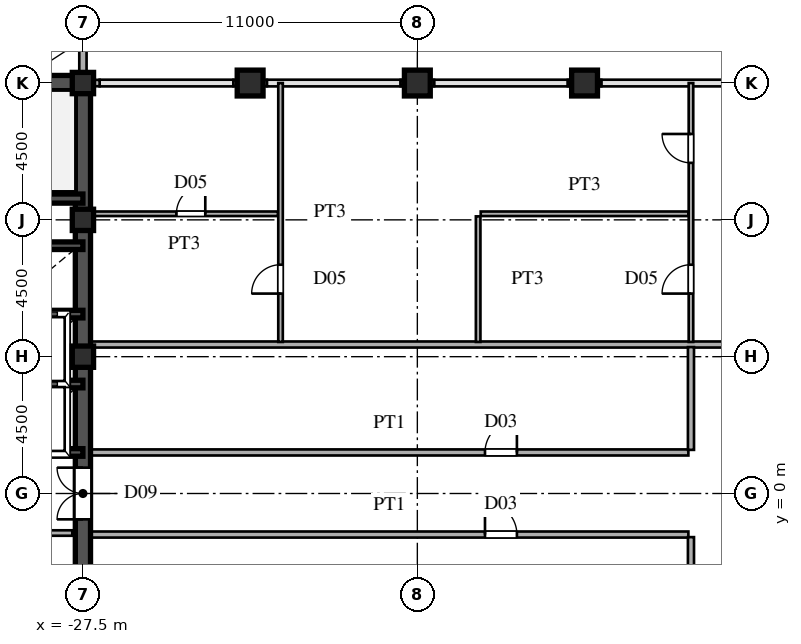
"""IFC4 building model, lengths in metres.
Left out: names, types, materials, properties, quantities, classifications, styles, units other than length and angle.
Written with IfcOpenShell. Run it as: python <this file> out.ifc"""

import sys

from ifc_helpers import new_model, si_unit, direction, frame, frame_2d, origin, origin_2d, place, context, subcontext, project, spatial, rectangle, hollow_rectangle, extrude, source, transform, mapped, element, fill, save


model = new_model("IFC4")
c1 = context("Model", 3, precision=1e-05, world=origin(), true_north=direction((0.0, 1.0)))
c2 = subcontext(c1, "Body", "Model", "MODEL_VIEW")
j1 = project(units=[si_unit("LENGTHUNIT", "METRE"), si_unit("PLANEANGLEUNIT", "RADIAN")], contexts=[c1])
p1 = place(None, origin())
s1 = spatial("IfcSite", under=j1, at=p1, CompositionType="ELEMENT")
p2 = place(p1, origin())
s2 = spatial("IfcBuilding", under=s1, at=p2, CompositionType="ELEMENT")
p3 = place(p2, frame((0.0, 0.0, 258.15)))
s3 = spatial("IfcBuildingStorey", under=s2, at=p3, CompositionType="ELEMENT", Elevation=258.15)
m1 = source(origin(), c2, "Body", "SweptSolid", [
    extrude(hollow_rectangle(XDim=0.7, YDim=0.7, WallThickness=0.03, at=origin_2d()), origin(), (0.0, 0.0, 1.0), 3.75),
])
for number, where, z_axis, x_axis in (
    (1, (-27.5, 4.5, 0.0), (0.0, 0.0, 1.0), (1.0, 0.0, 0.0)),
    (2, (-27.5, 9.0, 0.0), (0.0, 0.0, 1.0), (1.0, 0.0, 0.0)),
    (3, (-27.5, 13.5, 0.0), (0.0, 0.0, 1.0), (1.0, 0.0, 0.0)),
):
    element("IfcColumn", number, at=place(p3, frame(where, z_axis=z_axis, x_axis=x_axis)), inside=s3, PredefinedType="COLUMN", context=c2, shape_type="MappedRepresentation", body=[
        mapped(m1, transform((0.0, 0.0, 0.0), scale=1.0)),
    ])
m2 = source(origin(), c2, "Body", "SweptSolid", [
    extrude(hollow_rectangle(XDim=0.85, YDim=0.85, WallThickness=0.036, at=origin_2d()), origin(), (0.0, 0.0, 1.0), 3.75),
])
for number, where, z_axis, x_axis in (
    (4, (-22.0, 13.5, 0.0), (0.0, 0.0, 1.0), (1.0, 0.0, 0.0)),
    (5, (-16.5, 13.5, 0.0), (0.0, 0.0, 1.0), (1.0, 0.0, 0.0)),
    (6, (-11.0, 13.5, 0.0), (0.0, 0.0, 1.0), (1.0, 0.0, 0.0)),
):
    element("IfcColumn", number, at=place(p3, frame(where, z_axis=z_axis, x_axis=x_axis)), inside=s3, PredefinedType="COLUMN", context=c2, shape_type="MappedRepresentation", body=[
        mapped(m2, transform((0.0, 0.0, 0.0), scale=1.0)),
    ])
p4 = place(p3, frame((-27.5, 13.755, 0.0), z_axis=(0.0, 0.0, 1.0), x_axis=(0.0, 1.0, 0.0)))
e7 = element("IfcWall", 7, at=p4, inside=s3, PredefinedType="SOLIDWALL", context=c2, shape_type="SweptSolid", body=[
    extrude(rectangle(XDim=0.62, YDim=0.24, at=frame_2d((0.31, 0.0))), origin(), (0.0, 0.0, 1.0), 3.03),
])
p5 = place(p3, frame((-27.5, 14.375, 0.0), z_axis=(0.0, 0.0, 1.0), x_axis=(0.0, 1.0, 0.0)))
e8 = element("IfcWall", 8, at=p5, inside=s3, PredefinedType="SOLIDWALL", context=c2, shape_type="SweptSolid", body=[
    extrude(rectangle(XDim=1.605, YDim=0.24, at=frame_2d((0.803, 0.0))), origin(), (0.0, 0.0, 1.0), 3.53),
])
p6 = place(p3, frame((-27.49, 13.5, 0.0), z_axis=(0.0, 0.0, 1.0), x_axis=(1.0, 0.0, 0.0)))
e9 = element("IfcWall", 9, at=p6, inside=s3, PredefinedType="SOLIDWALL", context=c2, shape_type="SweptSolid", body=[
    extrude(rectangle(XDim=0.54, YDim=0.21, at=frame_2d((0.27, 0.0))), origin(), (0.0, 0.0, 1.0), 3.03),
])
for number, where, z_axis, x_axis in (
    (10, (-22.55, 13.5, 0.0), (0.0, 0.0, 1.0), (1.0, 0.0, 0.0)),
    (11, (-17.05, 13.5, 0.0), (0.0, 0.0, 1.0), (1.0, 0.0, 0.0)),
    (12, (-11.55, 13.5, 0.0), (0.0, 0.0, 1.0), (1.0, 0.0, 0.0)),
):
    element("IfcWall", number, at=place(p3, frame(where, z_axis=z_axis, x_axis=x_axis)), inside=s3, PredefinedType="SOLIDWALL", context=c2, shape_type="SweptSolid", body=[
        extrude(rectangle(XDim=1.1, YDim=0.21, at=frame_2d((0.55, 0.0))), origin(), (0.0, 0.0, 1.0), 3.03),
    ])
for number, where, z_axis, x_axis in (
    (13, (-27.5, -13.5, 0.0), (0.0, 0.0, 1.0), (0.0, 1.0, 0.0)),
    (14, (-27.5, 1.3, 0.0), (0.0, 0.0, 1.0), (0.0, 1.0, 0.0)),
):
    element("IfcWall", number, at=place(p3, frame(where, z_axis=z_axis, x_axis=x_axis)), inside=s3, PredefinedType="SHEAR", context=c2, shape_type="SweptSolid", body=[
        extrude(rectangle(XDim=12.2, YDim=0.5, at=frame_2d((6.1, 0.0))), origin(), (0.0, 0.0, 1.0), 3.53),
    ])
p7 = place(p3, frame((-27.5, -1.3, 0.0), z_axis=(0.0, 0.0, 1.0), x_axis=(0.0, 1.0, 0.0)))
e15 = element("IfcWall", 15, at=p7, inside=s3, PredefinedType="SHEAR", context=c2, shape_type="SweptSolid", body=[
    extrude(rectangle(XDim=2.6, YDim=0.5, at=frame_2d((1.3, 0.0))), origin(), (0.0, 0.0, 1.0), 3.53),
])
p8 = place(p7, frame((0.45, 0.0, 0.0)))
e16 = element("IfcOpeningElement", 16, at=p8, cuts=e15, PredefinedType="OPENING", context=c2, shape_type="SweptSolid", body=[
    extrude(rectangle(XDim=1.7, YDim=2.35, at=frame_2d((0.85, 1.175))), frame((0.0, 0.26, 0.0), z_axis=(0.0, -1.0, 0.0), x_axis=(1.0, 0.0, 0.0)), (0.0, 0.0, 1.0), 0.52),
])
p9 = place(p3, frame((-36.5, 13.5, 0.0), z_axis=(0.0, 0.0, 1.0), x_axis=(1.0, 0.0, 0.0)))
e17 = element("IfcWall", 17, at=p9, inside=s3, PredefinedType="SHEAR", context=c2, shape_type="SweptSolid", body=[
    extrude(rectangle(XDim=9.0, YDim=0.5, at=frame_2d((4.5, 0.0))), origin(), (0.0, 0.0, 1.0), 3.53),
])
p10 = place(p3, frame((-36.5, 9.7, 0.0), z_axis=(0.0, 0.0, 1.0), x_axis=(1.0, 0.0, 0.0)))
e18 = element("IfcWall", 18, at=p10, inside=s3, PredefinedType="SHEAR", context=c2, shape_type="SweptSolid", body=[
    extrude(rectangle(XDim=9.0, YDim=0.3, at=frame_2d((4.5, 0.0))), origin(), (0.0, 0.0, 1.0), 3.53),
])
p11 = place(p10, frame((0.6, 0.0, 0.0)))
e19 = element("IfcOpeningElement", 19, at=p11, cuts=e18, PredefinedType="OPENING", context=c2, shape_type="SweptSolid", body=[
    extrude(rectangle(XDim=1.1, YDim=2.2, at=frame_2d((0.55, 1.1))), frame((0.0, 0.16, 0.0), z_axis=(0.0, -1.0, 0.0), x_axis=(1.0, 0.0, 0.0)), (0.0, 0.0, 1.0), 0.32),
])
for number, where, z_axis, x_axis in (
    (20, (-30.3, 1.35, 0.0), (0.0, 0.0, 1.0), (1.0, 0.0, 0.0)),
    (21, (-30.3, 3.6, 0.0), (0.0, 0.0, 1.0), (1.0, 0.0, 0.0)),
    (22, (-30.3, 5.9, 0.0), (0.0, 0.0, 1.0), (1.0, 0.0, 0.0)),
    (23, (-30.3, 8.15, 0.0), (0.0, 0.0, 1.0), (1.0, 0.0, 0.0)),
):
    element("IfcWall", number, at=place(p3, frame(where, z_axis=z_axis, x_axis=x_axis)), inside=s3, PredefinedType="SHEAR", context=c2, shape_type="SweptSolid", body=[
        extrude(rectangle(XDim=2.8, YDim=0.25, at=frame_2d((1.4, 0.0))), origin(), (0.0, 0.0, 1.0), 3.53),
    ])
p12 = place(p3, frame((-30.3, -1.3, 0.0), z_axis=(0.0, 0.0, 1.0), x_axis=(1.0, 0.0, 0.0)))
e24 = element("IfcWall", 24, at=p12, inside=s3, PredefinedType="PARTITIONING", context=c2, shape_type="SweptSolid", body=[
    extrude(rectangle(XDim=2.45, YDim=0.18, at=frame_2d((1.225, 0.0))), origin(), (0.0, 0.0, 1.0), 3.53),
])
p13 = place(p12, frame((0.275, 0.0, 0.0)))
e25 = element("IfcOpeningElement", 25, at=p13, cuts=e24, PredefinedType="OPENING", context=c2, shape_type="SweptSolid", body=[
    extrude(rectangle(XDim=0.95, YDim=2.15, at=frame_2d((0.475, 1.075))), frame((0.0, 0.1, 0.0), z_axis=(0.0, -1.0, 0.0), x_axis=(1.0, 0.0, 0.0)), (0.0, 0.0, 1.0), 0.2),
])
p14 = place(p3, frame((-27.245, -1.35, 0.0), z_axis=(0.0, 0.0, 1.0), x_axis=(1.0, 0.0, 0.0)))
e26 = element("IfcWall", 26, at=p14, inside=s3, PredefinedType="PARTITIONING", context=c2, shape_type="SweptSolid", body=[
    extrude(rectangle(XDim=19.66, YDim=0.2, at=frame_2d((9.83, 0.0))), origin(), (0.0, 0.0, 1.0), 3.53),
])
p15 = place(p14, frame((12.97, 0.0, 0.0)))
e27 = element("IfcOpeningElement", 27, at=p15, cuts=e26, PredefinedType="OPENING", context=c2, shape_type="SweptSolid", body=[
    extrude(rectangle(XDim=1.05, YDim=2.25, at=frame_2d((0.525, 1.125))), frame((0.0, 0.11, 0.0), z_axis=(0.0, -1.0, 0.0), x_axis=(1.0, 0.0, 0.0)), (0.0, 0.0, 1.0), 0.22),
])
p16 = place(p3, frame((-27.245, 1.35, 0.0), z_axis=(0.0, 0.0, 1.0), x_axis=(1.0, 0.0, 0.0)))
e28 = element("IfcWall", 28, at=p16, inside=s3, PredefinedType="PARTITIONING", context=c2, shape_type="SweptSolid", body=[
    extrude(rectangle(XDim=19.66, YDim=0.2, at=frame_2d((9.83, 0.0))), origin(), (0.0, 0.0, 1.0), 3.53),
])
p17 = place(p16, frame((12.97, 0.0, 0.0)))
e29 = element("IfcOpeningElement", 29, at=p17, cuts=e28, PredefinedType="OPENING", context=c2, shape_type="SweptSolid", body=[
    extrude(rectangle(XDim=1.05, YDim=2.25, at=frame_2d((0.525, 1.125))), frame((0.0, 0.11, 0.0), z_axis=(0.0, -1.0, 0.0), x_axis=(1.0, 0.0, 0.0)), (0.0, 0.0, 1.0), 0.22),
])
p18 = place(p3, frame((-27.245, 4.9, 0.0), z_axis=(0.0, 0.0, 1.0), x_axis=(1.0, 0.0, 0.0)))
e30 = element("IfcWall", 30, at=p18, inside=s3, PredefinedType="PARTITIONING", context=c2, shape_type="SweptSolid", body=[
    extrude(rectangle(XDim=54.49, YDim=0.2, at=frame_2d((27.245, 0.0))), origin(), (0.0, 0.0, 1.0), 3.53),
])
p19 = place(p18, frame((22.47, 0.0, 0.0)))
e31 = element("IfcOpeningElement", 31, at=p19, cuts=e30, PredefinedType="OPENING", context=c2, shape_type="SweptSolid", body=[
    extrude(rectangle(XDim=1.05, YDim=2.25, at=frame_2d((0.525, 1.125))), frame((0.0, 0.11, 0.0), z_axis=(0.0, -1.0, 0.0), x_axis=(1.0, 0.0, 0.0)), (0.0, 0.0, 1.0), 0.22),
])
p20 = place(p3, frame((-27.245, 9.2, 0.0), z_axis=(0.0, 0.0, 1.0), x_axis=(1.0, 0.0, 0.0)))
e32 = element("IfcWall", 32, at=p20, inside=s3, PredefinedType="PARTITIONING", context=c2, shape_type="SweptSolid", body=[
    extrude(rectangle(XDim=6.16, YDim=0.15, at=frame_2d((3.08, 0.0))), origin(), (0.0, 0.0, 1.0), 3.53),
])
p21 = place(p20, frame((2.82, 0.0, 0.0)))
e33 = element("IfcOpeningElement", 33, at=p21, cuts=e32, PredefinedType="OPENING", context=c2, shape_type="SweptSolid", body=[
    extrude(rectangle(XDim=0.95, YDim=2.15, at=frame_2d((0.475, 1.075))), frame((0.0, 0.085, 0.0), z_axis=(0.0, -1.0, 0.0), x_axis=(1.0, 0.0, 0.0)), (0.0, 0.0, 1.0), 0.17),
])
p22 = place(p3, frame((-14.415, 9.2, 0.0), z_axis=(0.0, 0.0, 1.0), x_axis=(1.0, 0.0, 0.0)))
e34 = element("IfcWall", 34, at=p22, inside=s3, PredefinedType="PARTITIONING", context=c2, shape_type="SweptSolid", body=[
    extrude(rectangle(XDim=6.83, YDim=0.15, at=frame_2d((3.415, 0.0))), origin(), (0.0, 0.0, 1.0), 3.53),
])
p23 = place(p3, frame((-21.0, 4.985, 0.0), z_axis=(0.0, 0.0, 1.0), x_axis=(0.0, 1.0, 0.0)))
e35 = element("IfcWall", 35, at=p23, inside=s3, PredefinedType="PARTITIONING", context=c2, shape_type="SweptSolid", body=[
    extrude(rectangle(XDim=8.515, YDim=0.15, at=frame_2d((4.257, 0.0))), origin(), (0.0, 0.0, 1.0), 3.53),
])
p24 = place(p23, frame((1.59, 0.0, 0.0)))
e36 = element("IfcOpeningElement", 36, at=p24, cuts=e35, PredefinedType="OPENING", context=c2, shape_type="SweptSolid", body=[
    extrude(rectangle(XDim=0.95, YDim=2.15, at=frame_2d((0.475, 1.075))), frame((0.0, 0.085, 0.0), z_axis=(0.0, -1.0, 0.0), x_axis=(1.0, 0.0, 0.0)), (0.0, 0.0, 1.0), 0.17),
])
p25 = place(p3, frame((-14.5, 4.985, 0.0), z_axis=(0.0, 0.0, 1.0), x_axis=(0.0, 1.0, 0.0)))
e37 = element("IfcWall", 37, at=p25, inside=s3, PredefinedType="PARTITIONING", context=c2, shape_type="SweptSolid", body=[
    extrude(rectangle(XDim=4.13, YDim=0.15, at=frame_2d((2.065, 0.0))), origin(), (0.0, 0.0, 1.0), 3.53),
])
for number, where, z_axis, x_axis in (
    (38, (-7.5, -4.815, 0.0), (0.0, 0.0, 1.0), (0.0, 1.0, 0.0)),
    (39, (-7.5, 1.435, 0.0), (0.0, 0.0, 1.0), (0.0, 1.0, 0.0)),
):
    element("IfcWall", number, at=place(p3, frame(where, z_axis=z_axis, x_axis=x_axis)), inside=s3, PredefinedType="PARTITIONING", context=c2, shape_type="SweptSolid", body=[
        extrude(rectangle(XDim=3.38, YDim=0.2, at=frame_2d((1.69, 0.0))), origin(), (0.0, 0.0, 1.0), 3.53),
    ])
p26 = place(p3, frame((-7.5, 4.985, 0.0), z_axis=(0.0, 0.0, 1.0), x_axis=(0.0, 1.0, 0.0)))
e40 = element("IfcWall", 40, at=p26, inside=s3, PredefinedType="PARTITIONING", context=c2, shape_type="SweptSolid", body=[
    extrude(rectangle(XDim=8.515, YDim=0.15, at=frame_2d((4.257, 0.0))), origin(), (0.0, 0.0, 1.0), 3.53),
])
p27 = place(p26, frame((1.59, 0.0, 0.0)))
e41 = element("IfcOpeningElement", 41, at=p27, cuts=e40, PredefinedType="OPENING", context=c2, shape_type="SweptSolid", body=[
    extrude(rectangle(XDim=0.95, YDim=2.15, at=frame_2d((0.475, 1.075))), frame((0.0, 0.085, 0.0), z_axis=(0.0, -1.0, 0.0), x_axis=(1.0, 0.0, 0.0)), (0.0, 0.0, 1.0), 0.17),
])
p28 = place(p26, frame((5.89, 0.0, 0.0)))
e42 = element("IfcOpeningElement", 42, at=p28, cuts=e40, PredefinedType="OPENING", context=c2, shape_type="SweptSolid", body=[
    extrude(rectangle(XDim=0.95, YDim=2.15, at=frame_2d((0.475, 1.075))), frame((0.0, 0.085, 0.0), z_axis=(0.0, -1.0, 0.0), x_axis=(1.0, 0.0, 0.0)), (0.0, 0.0, 1.0), 0.17),
])
m3 = source(origin(), c2, "Body", "SweptSolid", [
    extrude(rectangle(XDim=1.7, YDim=2.35, at=frame_2d((0.85, 1.175))), frame((0.0, 0.025, 0.0), z_axis=(0.0, -1.0, 0.0), x_axis=(1.0, 0.0, 0.0)), (0.0, 0.0, 1.0), 0.05),
])
p29 = place(p8, origin())
e43 = element("IfcDoor", 43, at=p29, inside=s3, OperationType="DOUBLE_SWING_LEFT", PredefinedType="DOOR", context=c2, shape_type="MappedRepresentation", body=[
    mapped(m3, transform((0.0, 0.0, 0.0), scale=1.0)),
])
fill(e16, e43)
m4 = source(origin(), c2, "Body", "SweptSolid", [
    extrude(rectangle(XDim=1.05, YDim=2.25, at=frame_2d((0.525, 1.125))), frame((0.0, 0.025, 0.0), z_axis=(0.0, -1.0, 0.0), x_axis=(1.0, 0.0, 0.0)), (0.0, 0.0, 1.0), 0.05),
])
p30 = place(p15, origin())
e44 = element("IfcDoor", 44, at=p30, inside=s3, OperationType="SINGLE_SWING_LEFT", PredefinedType="DOOR", context=c2, shape_type="MappedRepresentation", body=[
    mapped(m4, transform((0.0, 0.0, 0.0), scale=1.0)),
])
fill(e27, e44)
p31 = place(p17, origin())
e45 = element("IfcDoor", 45, at=p31, inside=s3, OperationType="SINGLE_SWING_RIGHT", PredefinedType="DOOR", context=c2, shape_type="MappedRepresentation", body=[
    mapped(m4, transform((0.0, 0.0, 0.0), scale=1.0)),
])
fill(e29, e45)
m5 = source(origin(), c2, "Body", "SweptSolid", [
    extrude(rectangle(XDim=0.95, YDim=2.15, at=frame_2d((0.475, 1.075))), frame((0.0, 0.025, 0.0), z_axis=(0.0, -1.0, 0.0), x_axis=(1.0, 0.0, 0.0)), (0.0, 0.0, 1.0), 0.05),
])
p32 = place(p21, origin())
e46 = element("IfcDoor", 46, at=p32, inside=s3, OperationType="SINGLE_SWING_RIGHT", PredefinedType="DOOR", context=c2, shape_type="MappedRepresentation", body=[
    mapped(m5, transform((0.0, 0.0, 0.0), scale=1.0)),
])
fill(e33, e46)
p33 = place(p24, origin())
e47 = element("IfcDoor", 47, at=p33, inside=s3, OperationType="SINGLE_SWING_LEFT", PredefinedType="DOOR", context=c2, shape_type="MappedRepresentation", body=[
    mapped(m5, transform((0.0, 0.0, 0.0), scale=1.0)),
])
fill(e36, e47)
p34 = place(p27, origin())
e48 = element("IfcDoor", 48, at=p34, inside=s3, OperationType="SINGLE_SWING_LEFT", PredefinedType="DOOR", context=c2, shape_type="MappedRepresentation", body=[
    mapped(m5, transform((0.0, 0.0, 0.0), scale=1.0)),
])
fill(e41, e48)
p35 = place(p28, origin())
e49 = element("IfcDoor", 49, at=p35, inside=s3, OperationType="SINGLE_SWING_RIGHT", PredefinedType="DOOR", context=c2, shape_type="MappedRepresentation", body=[
    mapped(m5, transform((0.0, 0.0, 0.0), scale=1.0)),
])
fill(e42, e49)
save(model, sys.argv[1])
